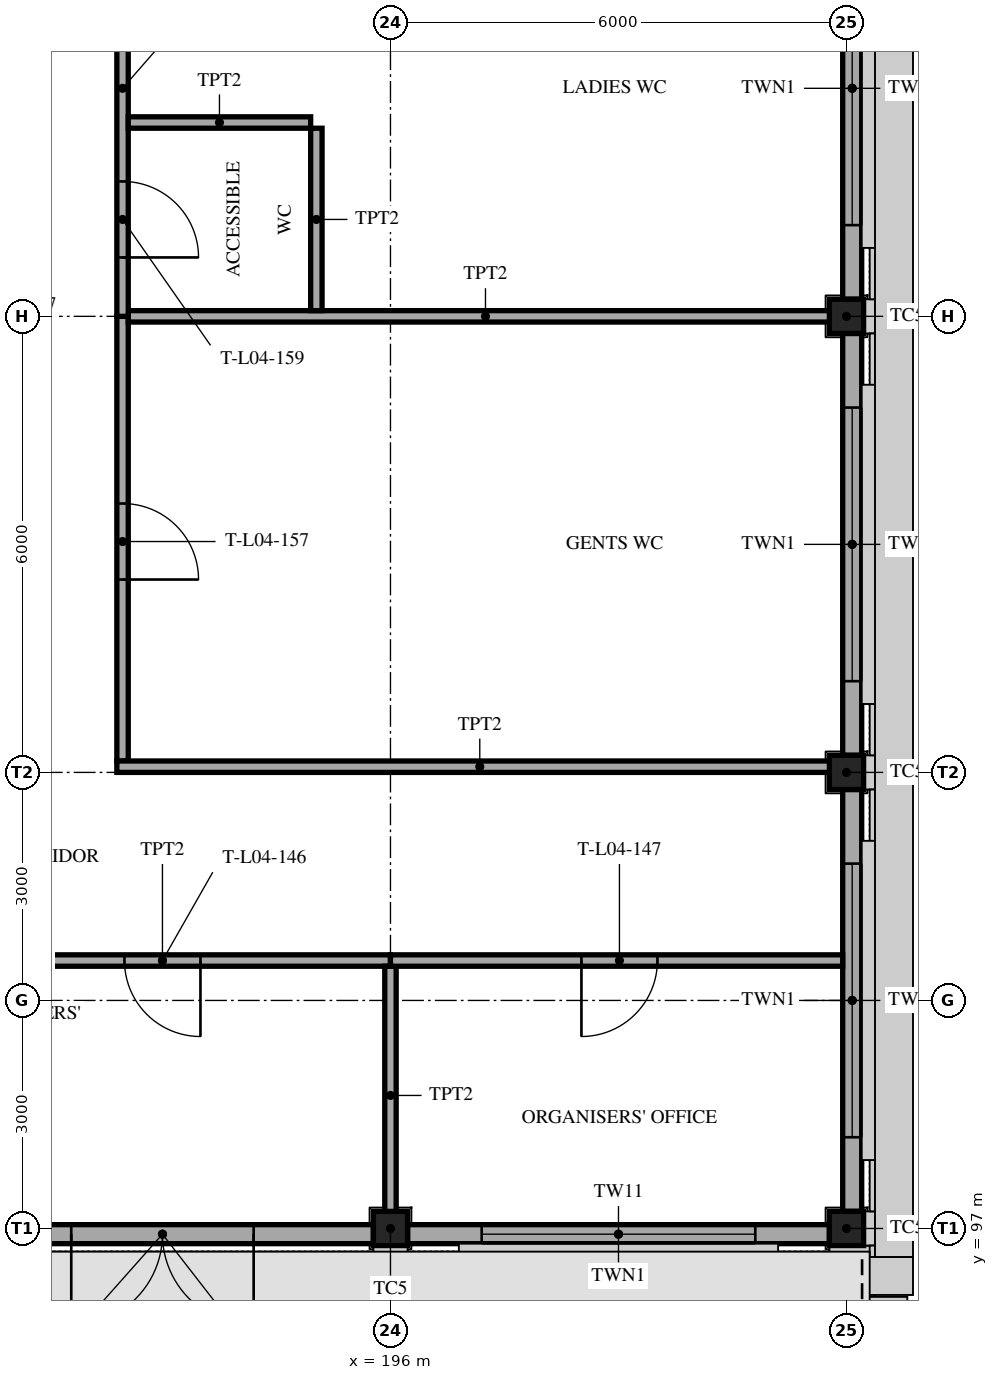
"""IFC4 building model, lengths in metres.
Left out: names, types, materials, properties, quantities, classifications, styles, units other than length and angle.
Written with IfcOpenShell. Run it as: python <this file> out.ifc"""

import sys

from ifc_helpers import new_model, si_unit, direction, frame, frame_2d, origin, origin_2d, place, context, subcontext, project, spatial, polyline, rectangle, hollow_rectangle, outline, extrude, element, fill, save


model = new_model("IFC4")
c1 = context("Model", 3, precision=1e-05, world=origin(), true_north=direction((0.0, 1.0)))
c2 = subcontext(c1, "Body", "Model", "MODEL_VIEW")
j1 = project(units=[si_unit("LENGTHUNIT", "METRE"), si_unit("PLANEANGLEUNIT", "RADIAN")], contexts=[c1])
p1 = place(None, origin())
s1 = spatial("IfcSite", under=j1, at=p1, CompositionType="ELEMENT")
p2 = place(p1, origin())
s2 = spatial("IfcBuilding", under=s1, at=p2, CompositionType="ELEMENT")
p3 = place(p2, frame((0.0, 0.0, 19.2)))
s3 = spatial("IfcBuildingStorey", under=s2, at=p3, CompositionType="ELEMENT", Elevation=19.2)
for number, where, z_axis, x_axis in (
    (1, (202.0, 97.0, 0.0), (0.0, 0.0, 1.0), (1.0, 0.0, 0.0)),
    (2, (202.0, 103.0, 0.0), (0.0, 0.0, 1.0), (1.0, 0.0, 0.0)),
    (3, (202.0, 109.0, 0.0), (0.0, 0.0, 1.0), (1.0, 0.0, 0.0)),
    (4, (196.0, 97.0, 0.0), (0.0, 0.0, 1.0), (1.0, 0.0, 0.0)),
):
    element("IfcColumn", number, at=place(p3, frame(where, z_axis=z_axis, x_axis=x_axis)), inside=s3, PredefinedType="COLUMN", context=c2, shape_type="SweptSolid", body=[
        extrude(hollow_rectangle(XDim=0.45, YDim=0.45, WallThickness=0.025, at=origin_2d()), origin(), (0.0, 0.0, 1.0), 4.2),
    ])
p4 = place(p3, frame((196.225, 96.925, 0.0), z_axis=(0.0, 0.0, 1.0), x_axis=(1.0, 0.0, 0.0)))
e5 = element("IfcWall", 5, at=p4, inside=s3, PredefinedType="SOLIDWALL", context=c2, shape_type="SweptSolid", body=[
    extrude(rectangle(XDim=5.55, YDim=0.25, at=frame_2d((2.775, 0.0))), origin(), (0.0, 0.0, 1.0), 3.55),
])
p5 = place(p4, frame((0.975, 0.0, 0.9)))
e6 = element("IfcOpeningElement", 6, at=p5, cuts=e5, PredefinedType="OPENING", context=c2, shape_type="SweptSolid", body=[
    extrude(rectangle(XDim=3.6, YDim=2.4, at=frame_2d((1.8, 1.2))), frame((0.0, 0.135, 0.0), z_axis=(0.0, -1.0, 0.0), x_axis=(1.0, 0.0, 0.0)), (0.0, 0.0, 1.0), 0.27),
])
p6 = place(p3, frame((202.075, 91.225, 0.0), z_axis=(0.0, 0.0, 1.0), x_axis=(0.0, 1.0, 0.0)))
e7 = element("IfcWall", 7, at=p6, inside=s3, PredefinedType="SOLIDWALL", context=c2, shape_type="SweptSolid", body=[
    extrude(rectangle(XDim=5.55, YDim=0.25, at=frame_2d((2.775, 0.0))), origin(), (0.0, 0.0, 1.0), 3.55),
])
p7 = place(p6, frame((0.975, 0.0, 0.9)))
e8 = element("IfcOpeningElement", 8, at=p7, cuts=e7, PredefinedType="OPENING", context=c2, shape_type="SweptSolid", body=[
    extrude(rectangle(XDim=3.6, YDim=2.4, at=frame_2d((1.8, 1.2))), frame((0.0, 0.135, 0.0), z_axis=(0.0, -1.0, 0.0), x_axis=(1.0, 0.0, 0.0)), (0.0, 0.0, 1.0), 0.27),
])
p8 = place(p3, frame((202.075, 97.225, 0.0), z_axis=(0.0, 0.0, 1.0), x_axis=(0.0, 1.0, 0.0)))
e9 = element("IfcWall", 9, at=p8, inside=s3, PredefinedType="SOLIDWALL", context=c2, shape_type="SweptSolid", body=[
    extrude(rectangle(XDim=5.55, YDim=0.25, at=frame_2d((2.775, 0.0))), origin(), (0.0, 0.0, 1.0), 3.55),
])
p9 = place(p8, frame((0.975, 0.0, 0.9)))
e10 = element("IfcOpeningElement", 10, at=p9, cuts=e9, PredefinedType="OPENING", context=c2, shape_type="SweptSolid", body=[
    extrude(rectangle(XDim=3.6, YDim=2.4, at=frame_2d((1.8, 1.2))), frame((0.0, 0.135, 0.0), z_axis=(0.0, -1.0, 0.0), x_axis=(1.0, 0.0, 0.0)), (0.0, 0.0, 1.0), 0.27),
])
p10 = place(p3, frame((202.075, 103.225, 0.0), z_axis=(0.0, 0.0, 1.0), x_axis=(0.0, 1.0, 0.0)))
e11 = element("IfcWall", 11, at=p10, inside=s3, PredefinedType="SOLIDWALL", context=c2, shape_type="SweptSolid", body=[
    extrude(rectangle(XDim=5.55, YDim=0.25, at=frame_2d((2.775, 0.0))), origin(), (0.0, 0.0, 1.0), 3.55),
])
p11 = place(p10, frame((0.975, 0.0, 0.9)))
e12 = element("IfcOpeningElement", 12, at=p11, cuts=e11, PredefinedType="OPENING", context=c2, shape_type="SweptSolid", body=[
    extrude(rectangle(XDim=3.6, YDim=2.4, at=frame_2d((1.8, 1.2))), frame((0.0, 0.135, 0.0), z_axis=(0.0, -1.0, 0.0), x_axis=(1.0, 0.0, 0.0)), (0.0, 0.0, 1.0), 0.27),
])
p12 = place(p3, frame((202.075, 109.225, 0.0), z_axis=(0.0, 0.0, 1.0), x_axis=(0.0, 1.0, 0.0)))
e13 = element("IfcWall", 13, at=p12, inside=s3, PredefinedType="SOLIDWALL", context=c2, shape_type="SweptSolid", body=[
    extrude(rectangle(XDim=5.55, YDim=0.25, at=frame_2d((2.775, 0.0))), origin(), (0.0, 0.0, 1.0), 3.55),
])
p13 = place(p12, frame((0.975, 0.0, 0.9)))
e14 = element("IfcOpeningElement", 14, at=p13, cuts=e13, PredefinedType="OPENING", context=c2, shape_type="SweptSolid", body=[
    extrude(rectangle(XDim=3.6, YDim=2.4, at=frame_2d((1.8, 1.2))), frame((0.0, 0.135, 0.0), z_axis=(0.0, -1.0, 0.0), x_axis=(1.0, 0.0, 0.0)), (0.0, 0.0, 1.0), 0.27),
])
p14 = place(p3, frame((190.225, 96.925, 0.0), z_axis=(0.0, 0.0, 1.0), x_axis=(1.0, 0.0, 0.0)))
e15 = element("IfcWall", 15, at=p14, inside=s3, PredefinedType="SOLIDWALL", context=c2, shape_type="SweptSolid", body=[
    extrude(rectangle(XDim=5.55, YDim=0.25, at=frame_2d((2.775, 0.0))), origin(), (0.0, 0.0, 1.0), 3.55),
])
p15 = place(p14, frame((1.575, 0.0, 0.0)))
e16 = element("IfcOpeningElement", 16, at=p15, cuts=e15, PredefinedType="OPENING", context=c2, shape_type="SweptSolid", body=[
    extrude(rectangle(XDim=2.4, YDim=2.1, at=frame_2d((1.2, 1.05))), frame((0.0, 0.135, 0.0), z_axis=(0.0, -1.0, 0.0), x_axis=(1.0, 0.0, 0.0)), (0.0, 0.0, 1.0), 0.27),
])
p16 = place(p3, frame((190.0, 100.525, 0.0), z_axis=(0.0, 0.0, 1.0), x_axis=(1.0, 0.0, 0.0)))
e17 = element("IfcWall", 17, at=p16, inside=s3, PredefinedType="PARTITIONING", context=c2, shape_type="SweptSolid", body=[
    extrude(rectangle(XDim=6.0, YDim=0.15, at=frame_2d((3.0, 0.0))), origin(), (0.0, 0.0, 1.0), 3.45),
])
p17 = place(p16, frame((2.5, 0.0, 0.0)))
e18 = element("IfcOpeningElement", 18, at=p17, cuts=e17, PredefinedType="OPENING", context=c2, shape_type="SweptSolid", body=[
    extrude(rectangle(XDim=1.0, YDim=2.1, at=frame_2d((0.5, 1.05))), frame((0.0, 0.085, 0.0), z_axis=(0.0, -1.0, 0.0), x_axis=(1.0, 0.0, 0.0)), (0.0, 0.0, 1.0), 0.17),
])
p18 = place(p3, frame((196.0, 97.05, 0.0), z_axis=(0.0, 0.0, 1.0), x_axis=(0.0, 1.0, 0.0)))
e19 = element("IfcWall", 19, at=p18, inside=s3, PredefinedType="PARTITIONING", context=c2, shape_type="SweptSolid", body=[
    extrude(rectangle(XDim=3.4, YDim=0.15, at=frame_2d((1.7, 0.0))), origin(), (0.0, 0.0, 1.0), 3.45),
])
p19 = place(p3, frame((196.0, 100.525, 0.0), z_axis=(0.0, 0.0, 1.0), x_axis=(1.0, 0.0, 0.0)))
e20 = element("IfcWall", 20, at=p19, inside=s3, PredefinedType="PARTITIONING", context=c2, shape_type="SweptSolid", body=[
    extrude(rectangle(XDim=5.95, YDim=0.15, at=frame_2d((2.975, 0.0))), origin(), (0.0, 0.0, 1.0), 3.45),
])
p20 = place(p19, frame((2.512, 0.0, 0.0)))
e21 = element("IfcOpeningElement", 21, at=p20, cuts=e20, PredefinedType="OPENING", context=c2, shape_type="SweptSolid", body=[
    extrude(rectangle(XDim=1.0, YDim=2.1, at=frame_2d((0.5, 1.05))), frame((0.0, 0.085, 0.0), z_axis=(0.0, -1.0, 0.0), x_axis=(1.0, 0.0, 0.0)), (0.0, 0.0, 1.0), 0.17),
])
p21 = place(p3, frame((192.475, 103.15, 0.0), z_axis=(0.0, 0.0, 1.0), x_axis=(0.0, 1.0, 0.0)))
e22 = element("IfcWall", 22, at=p21, inside=s3, PredefinedType="PARTITIONING", context=c2, shape_type="SweptSolid", body=[
    extrude(rectangle(XDim=5.85, YDim=0.15, at=frame_2d((2.925, 0.0))), origin(), (0.0, 0.0, 1.0), 3.45),
])
p22 = place(p21, frame((2.387, 0.0, 0.0)))
e23 = element("IfcOpeningElement", 23, at=p22, cuts=e22, PredefinedType="OPENING", context=c2, shape_type="SweptSolid", body=[
    extrude(rectangle(XDim=1.0, YDim=2.1, at=frame_2d((0.5, 1.05))), frame((0.0, 0.085, 0.0), z_axis=(0.0, -1.0, 0.0), x_axis=(1.0, 0.0, 0.0)), (0.0, 0.0, 1.0), 0.17),
])
p23 = place(p3, frame((192.55, 109.0, 0.0), z_axis=(0.0, 0.0, 1.0), x_axis=(1.0, 0.0, 0.0)))
e24 = element("IfcWall", 24, at=p23, inside=s3, PredefinedType="PARTITIONING", context=c2, shape_type="SweptSolid", body=[
    extrude(rectangle(XDim=9.4, YDim=0.15, at=frame_2d((4.7, 0.0))), origin(), (0.0, 0.0, 1.0), 3.45),
])
p24 = place(p3, frame((192.475, 109.0, 0.0), z_axis=(0.0, 0.0, 1.0), x_axis=(0.0, 1.0, 0.0)))
e25 = element("IfcWall", 25, at=p24, inside=s3, PredefinedType="PARTITIONING", context=c2, shape_type="SweptSolid", body=[
    extrude(rectangle(XDim=6.0, YDim=0.15, at=frame_2d((3.0, 0.0))), origin(), (0.0, 0.0, 1.0), 3.45),
])
p25 = place(p24, frame((3.7, 0.0, 0.0)))
e26 = element("IfcOpeningElement", 26, at=p25, cuts=e25, PredefinedType="OPENING", context=c2, shape_type="SweptSolid", body=[
    extrude(rectangle(XDim=1.0, YDim=2.1, at=frame_2d((0.5, 1.05))), frame((0.0, 0.085, 0.0), z_axis=(0.0, -1.0, 0.0), x_axis=(1.0, 0.0, 0.0)), (0.0, 0.0, 1.0), 0.17),
])
p26 = place(p24, frame((0.775, 0.0, 0.0)))
e27 = element("IfcOpeningElement", 27, at=p26, cuts=e25, PredefinedType="OPENING", context=c2, shape_type="SweptSolid", body=[
    extrude(rectangle(XDim=1.0, YDim=2.1, at=frame_2d((0.5, 1.05))), frame((0.0, 0.085, 0.0), z_axis=(0.0, -1.0, 0.0), x_axis=(1.0, 0.0, 0.0)), (0.0, 0.0, 1.0), 0.17),
])
p27 = place(p3, frame((195.025, 109.075, 0.0), z_axis=(0.0, 0.0, 1.0), x_axis=(0.0, 1.0, 0.0)))
e28 = element("IfcWall", 28, at=p27, inside=s3, PredefinedType="PARTITIONING", context=c2, shape_type="SweptSolid", body=[
    extrude(rectangle(XDim=2.4, YDim=0.15, at=frame_2d((1.2, 0.0))), origin(), (0.0, 0.0, 1.0), 3.45),
])
p28 = place(p3, frame((192.55, 111.55, 0.0), z_axis=(0.0, 0.0, 1.0), x_axis=(1.0, 0.0, 0.0)))
e29 = element("IfcWall", 29, at=p28, inside=s3, PredefinedType="PARTITIONING", context=c2, shape_type="SweptSolid", body=[
    extrude(rectangle(XDim=2.4, YDim=0.15, at=frame_2d((1.2, 0.0))), origin(), (0.0, 0.0, 1.0), 3.7),
])
p29 = place(p3, frame((192.4, 103.075, 0.0), z_axis=(0.0, 0.0, 1.0), x_axis=(1.0, 0.0, 0.0)))
e30 = element("IfcWall", 30, at=p29, inside=s3, PredefinedType="PARTITIONING", context=c2, shape_type="SweptSolid", body=[
    extrude(rectangle(XDim=9.55, YDim=0.15, at=frame_2d((4.775, 0.0))), origin(), (0.0, 0.0, 1.0), 3.45),
])
p30 = place(p5, origin())
e31 = element("IfcWindow", 31, at=p30, inside=s3, PartitioningType="TRIPLE_PANEL_VERTICAL", PredefinedType="WINDOW", context=c2, shape_type="SweptSolid", body=[
    extrude(outline(polyline([(0.0, 0.0), (3.6, 0.0), (3.6, 2.4), (0.0, 2.4), (0.0, 0.0)]), holes=[polyline([(0.06, 0.06), (0.96, 0.06), (0.96, 2.34), (0.06, 2.34), (0.06, 0.06)]), polyline([(1.06, 0.06), (2.54, 0.06), (2.54, 2.34), (1.06, 2.34), (1.06, 0.06)]), polyline([(2.64, 0.06), (3.54, 0.06), (3.54, 2.34), (2.64, 2.34), (2.64, 0.06)])]), frame((0.0, 0.03, 0.0), z_axis=(0.0, -1.0, 0.0), x_axis=(1.0, 0.0, 0.0)), (0.0, 0.0, 1.0), 0.06),
    extrude(rectangle(XDim=0.924, YDim=2.304, at=frame_2d((0.51, 1.2))), frame((0.0, 0.01, 0.0), z_axis=(0.0, -1.0, 0.0), x_axis=(1.0, 0.0, 0.0)), (0.0, 0.0, 1.0), 0.02),
    extrude(rectangle(XDim=1.504, YDim=2.304, at=frame_2d((1.8, 1.2))), frame((0.0, 0.01, 0.0), z_axis=(0.0, -1.0, 0.0), x_axis=(1.0, 0.0, 0.0)), (0.0, 0.0, 1.0), 0.02),
    extrude(rectangle(XDim=0.924, YDim=2.304, at=frame_2d((3.09, 1.2))), frame((0.0, 0.01, 0.0), z_axis=(0.0, -1.0, 0.0), x_axis=(1.0, 0.0, 0.0)), (0.0, 0.0, 1.0), 0.02),
])
fill(e6, e31)
p31 = place(p9, origin())
e32 = element("IfcWindow", 32, at=p31, inside=s3, PartitioningType="TRIPLE_PANEL_VERTICAL", PredefinedType="WINDOW", context=c2, shape_type="SweptSolid", body=[
    extrude(outline(polyline([(0.0, 0.0), (3.6, 0.0), (3.6, 2.4), (0.0, 2.4), (0.0, 0.0)]), holes=[polyline([(0.06, 0.06), (0.96, 0.06), (0.96, 2.34), (0.06, 2.34), (0.06, 0.06)]), polyline([(1.06, 0.06), (2.54, 0.06), (2.54, 2.34), (1.06, 2.34), (1.06, 0.06)]), polyline([(2.64, 0.06), (3.54, 0.06), (3.54, 2.34), (2.64, 2.34), (2.64, 0.06)])]), frame((0.0, 0.03, 0.0), z_axis=(0.0, -1.0, 0.0), x_axis=(1.0, 0.0, 0.0)), (0.0, 0.0, 1.0), 0.06),
    extrude(rectangle(XDim=0.924, YDim=2.304, at=frame_2d((0.51, 1.2))), frame((0.0, 0.01, 0.0), z_axis=(0.0, -1.0, 0.0), x_axis=(1.0, 0.0, 0.0)), (0.0, 0.0, 1.0), 0.02),
    extrude(rectangle(XDim=1.504, YDim=2.304, at=frame_2d((1.8, 1.2))), frame((0.0, 0.01, 0.0), z_axis=(0.0, -1.0, 0.0), x_axis=(1.0, 0.0, 0.0)), (0.0, 0.0, 1.0), 0.02),
    extrude(rectangle(XDim=0.924, YDim=2.304, at=frame_2d((3.09, 1.2))), frame((0.0, 0.01, 0.0), z_axis=(0.0, -1.0, 0.0), x_axis=(1.0, 0.0, 0.0)), (0.0, 0.0, 1.0), 0.02),
])
fill(e10, e32)
p32 = place(p11, origin())
e33 = element("IfcWindow", 33, at=p32, inside=s3, PartitioningType="TRIPLE_PANEL_VERTICAL", PredefinedType="WINDOW", context=c2, shape_type="SweptSolid", body=[
    extrude(outline(polyline([(0.0, 0.0), (3.6, 0.0), (3.6, 2.4), (0.0, 2.4), (0.0, 0.0)]), holes=[polyline([(0.06, 0.06), (0.96, 0.06), (0.96, 2.34), (0.06, 2.34), (0.06, 0.06)]), polyline([(1.06, 0.06), (2.54, 0.06), (2.54, 2.34), (1.06, 2.34), (1.06, 0.06)]), polyline([(2.64, 0.06), (3.54, 0.06), (3.54, 2.34), (2.64, 2.34), (2.64, 0.06)])]), frame((0.0, 0.03, 0.0), z_axis=(0.0, -1.0, 0.0), x_axis=(1.0, 0.0, 0.0)), (0.0, 0.0, 1.0), 0.06),
    extrude(rectangle(XDim=0.924, YDim=2.304, at=frame_2d((0.51, 1.2))), frame((0.0, 0.01, 0.0), z_axis=(0.0, -1.0, 0.0), x_axis=(1.0, 0.0, 0.0)), (0.0, 0.0, 1.0), 0.02),
    extrude(rectangle(XDim=1.504, YDim=2.304, at=frame_2d((1.8, 1.2))), frame((0.0, 0.01, 0.0), z_axis=(0.0, -1.0, 0.0), x_axis=(1.0, 0.0, 0.0)), (0.0, 0.0, 1.0), 0.02),
    extrude(rectangle(XDim=0.924, YDim=2.304, at=frame_2d((3.09, 1.2))), frame((0.0, 0.01, 0.0), z_axis=(0.0, -1.0, 0.0), x_axis=(1.0, 0.0, 0.0)), (0.0, 0.0, 1.0), 0.02),
])
fill(e12, e33)
p33 = place(p13, origin())
e34 = element("IfcWindow", 34, at=p33, inside=s3, PartitioningType="TRIPLE_PANEL_VERTICAL", PredefinedType="WINDOW", context=c2, shape_type="SweptSolid", body=[
    extrude(outline(polyline([(0.0, 0.0), (3.6, 0.0), (3.6, 2.4), (0.0, 2.4), (0.0, 0.0)]), holes=[polyline([(0.06, 0.06), (0.96, 0.06), (0.96, 2.34), (0.06, 2.34), (0.06, 0.06)]), polyline([(1.06, 0.06), (2.54, 0.06), (2.54, 2.34), (1.06, 2.34), (1.06, 0.06)]), polyline([(2.64, 0.06), (3.54, 0.06), (3.54, 2.34), (2.64, 2.34), (2.64, 0.06)])]), frame((0.0, 0.03, 0.0), z_axis=(0.0, -1.0, 0.0), x_axis=(1.0, 0.0, 0.0)), (0.0, 0.0, 1.0), 0.06),
    extrude(rectangle(XDim=0.924, YDim=2.304, at=frame_2d((0.51, 1.2))), frame((0.0, 0.01, 0.0), z_axis=(0.0, -1.0, 0.0), x_axis=(1.0, 0.0, 0.0)), (0.0, 0.0, 1.0), 0.02),
    extrude(rectangle(XDim=1.504, YDim=2.304, at=frame_2d((1.8, 1.2))), frame((0.0, 0.01, 0.0), z_axis=(0.0, -1.0, 0.0), x_axis=(1.0, 0.0, 0.0)), (0.0, 0.0, 1.0), 0.02),
    extrude(rectangle(XDim=0.924, YDim=2.304, at=frame_2d((3.09, 1.2))), frame((0.0, 0.01, 0.0), z_axis=(0.0, -1.0, 0.0), x_axis=(1.0, 0.0, 0.0)), (0.0, 0.0, 1.0), 0.02),
])
fill(e14, e34)
p34 = place(p15, frame((2.4, 0.0, 0.0), z_axis=(0.0, 0.0, 1.0), x_axis=(-1.0, 0.0, 0.0)))
e35 = element("IfcDoor", 35, at=p34, inside=s3, OperationType="DOUBLE_DOOR_SINGLE_SWING", PredefinedType="DOOR", context=c2, shape_type="SweptSolid", body=[
    extrude(rectangle(XDim=2.4, YDim=2.1, at=frame_2d((1.2, 1.05))), frame((0.0, 0.025, 0.0), z_axis=(0.0, -1.0, 0.0), x_axis=(1.0, 0.0, 0.0)), (0.0, 0.0, 1.0), 0.05),
])
fill(e16, e35)
p35 = place(p17, frame((1.0, 0.0, 0.0), z_axis=(0.0, 0.0, 1.0), x_axis=(-1.0, 0.0, 0.0)))
e36 = element("IfcDoor", 36, at=p35, inside=s3, OperationType="SINGLE_SWING_LEFT", PredefinedType="DOOR", context=c2, shape_type="SweptSolid", body=[
    extrude(rectangle(XDim=1.0, YDim=2.1, at=frame_2d((0.5, 1.05))), frame((0.0, 0.025, 0.0), z_axis=(0.0, -1.0, 0.0), x_axis=(1.0, 0.0, 0.0)), (0.0, 0.0, 1.0), 0.05),
])
fill(e18, e36)
p36 = place(p20, frame((1.0, 0.0, 0.0), z_axis=(0.0, 0.0, 1.0), x_axis=(-1.0, 0.0, 0.0)))
e37 = element("IfcDoor", 37, at=p36, inside=s3, OperationType="SINGLE_SWING_RIGHT", PredefinedType="DOOR", context=c2, shape_type="SweptSolid", body=[
    extrude(rectangle(XDim=1.0, YDim=2.1, at=frame_2d((0.5, 1.05))), frame((0.0, 0.025, 0.0), z_axis=(0.0, -1.0, 0.0), x_axis=(1.0, 0.0, 0.0)), (0.0, 0.0, 1.0), 0.05),
])
fill(e21, e37)
p37 = place(p22, frame((1.0, 0.0, 0.0), z_axis=(0.0, 0.0, 1.0), x_axis=(-1.0, 0.0, 0.0)))
e38 = element("IfcDoor", 38, at=p37, inside=s3, OperationType="SINGLE_SWING_RIGHT", PredefinedType="DOOR", context=c2, shape_type="SweptSolid", body=[
    extrude(rectangle(XDim=1.0, YDim=2.1, at=frame_2d((0.5, 1.05))), frame((0.0, 0.025, 0.0), z_axis=(0.0, -1.0, 0.0), x_axis=(1.0, 0.0, 0.0)), (0.0, 0.0, 1.0), 0.05),
])
fill(e23, e38)
p38 = place(p26, frame((1.0, 0.0, 0.0), z_axis=(0.0, 0.0, 1.0), x_axis=(-1.0, 0.0, 0.0)))
e39 = element("IfcDoor", 39, at=p38, inside=s3, OperationType="SINGLE_SWING_RIGHT", PredefinedType="DOOR", context=c2, shape_type="SweptSolid", body=[
    extrude(rectangle(XDim=1.0, YDim=2.1, at=frame_2d((0.5, 1.05))), frame((0.0, 0.025, 0.0), z_axis=(0.0, -1.0, 0.0), x_axis=(1.0, 0.0, 0.0)), (0.0, 0.0, 1.0), 0.05),
])
fill(e27, e39)
save(model, sys.argv[1])
